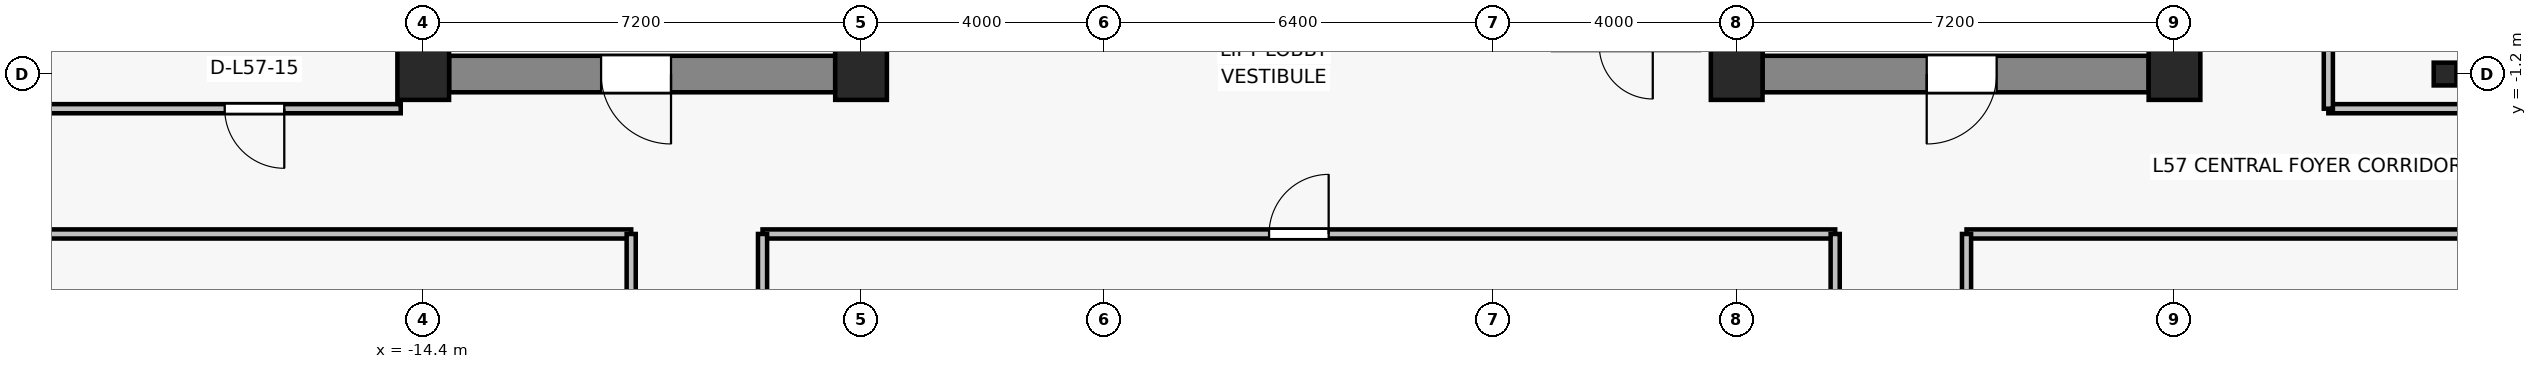
"""IFC4 building model, lengths in metres.
Left out: names, types, materials, properties, quantities, classifications, styles, units other than length and angle.
Written with IfcOpenShell. Run it as: python <this file> out.ifc"""

import sys

from ifc_helpers import new_model, si_unit, direction, frame, frame_2d, origin, origin_2d, place, context, subcontext, project, spatial, rectangle, i_section, extrude, source, transform, mapped, element, fill, save


model = new_model("IFC4")
c1 = context("Model", 3, precision=1e-05, world=origin(), true_north=direction((0.0, 1.0)))
c2 = subcontext(c1, "Body", "Model", "MODEL_VIEW")
j1 = project(units=[si_unit("LENGTHUNIT", "METRE"), si_unit("PLANEANGLEUNIT", "RADIAN")], contexts=[c1])
p1 = place(None, origin())
s1 = spatial("IfcSite", under=j1, at=p1, CompositionType="ELEMENT")
p2 = place(p1, origin())
s2 = spatial("IfcBuilding", under=s1, at=p2, CompositionType="ELEMENT")
p3 = place(p2, frame((0.0, 0.0, 205.6)))
s3 = spatial("IfcBuildingStorey", under=s2, at=p3, CompositionType="ELEMENT", Elevation=205.6)
for number, where, z_axis, x_axis in (
    (1, (-14.4, -1.2, 0.0), (0.0, 0.0, 1.0), (1.0, 0.0, 0.0)),
    (2, (-7.2, -1.2, 0.0), (0.0, 0.0, 1.0), (1.0, 0.0, 0.0)),
    (3, (7.2, -1.2, 0.0), (0.0, 0.0, 1.0), (1.0, 0.0, 0.0)),
    (4, (14.4, -1.2, 0.0), (0.0, 0.0, 1.0), (1.0, 0.0, 0.0)),
):
    element("IfcColumn", number, at=place(p3, frame(where, z_axis=z_axis, x_axis=x_axis)), inside=s3, PredefinedType="COLUMN", context=c2, shape_type="SweptSolid", body=[
        extrude(rectangle(XDim=0.85, YDim=0.85, at=origin_2d()), origin(), (0.0, 0.0, 1.0), 3.3),
    ])
p4 = place(p3, frame((18.85, -1.2, 0.0), z_axis=(0.0, 0.0, 1.0), x_axis=(1.0, 0.0, 0.0)))
e5 = element("IfcColumn", 5, at=p4, inside=s3, PredefinedType="COLUMN", context=c2, shape_type="SweptSolid", body=[
    extrude(i_section(OverallWidth=0.375, OverallDepth=0.375, WebThickness=0.017, FlangeThickness=0.027, FilletRadius=0.015, at=origin_2d()), origin(), (0.0, 0.0, 1.0), 3.3),
])
p5 = place(p3, frame((-7.625, -1.2, 0.0), z_axis=(0.0, 0.0, 1.0), x_axis=(-1.0, 0.0, 0.0)))
e6 = element("IfcWall", 6, at=p5, inside=s3, PredefinedType="SHEAR", context=c2, shape_type="SweptSolid", body=[
    extrude(rectangle(XDim=6.35, YDim=0.6, at=frame_2d((3.175, 0.0))), origin(), (0.0, 0.0, 1.0), 3.075),
])
p6 = place(p5, frame((2.7, 0.0, 0.0)))
e7 = element("IfcOpeningElement", 7, at=p6, cuts=e6, PredefinedType="OPENING", context=c2, shape_type="SweptSolid", body=[
    extrude(rectangle(XDim=1.15, YDim=2.15, at=frame_2d((0.575, 1.075))), frame((0.0, 0.31, 0.0), z_axis=(0.0, -1.0, 0.0), x_axis=(1.0, 0.0, 0.0)), (0.0, 0.0, 1.0), 0.62),
])
p7 = place(p3, frame((13.975, -1.2, 0.0), z_axis=(0.0, 0.0, 1.0), x_axis=(-1.0, 0.0, 0.0)))
e8 = element("IfcWall", 8, at=p7, inside=s3, PredefinedType="SHEAR", context=c2, shape_type="SweptSolid", body=[
    extrude(rectangle(XDim=6.35, YDim=0.6, at=frame_2d((3.175, 0.0))), origin(), (0.0, 0.0, 1.0), 3.075),
])
p8 = place(p7, frame((2.5, 0.0, 0.0)))
e9 = element("IfcOpeningElement", 9, at=p8, cuts=e8, PredefinedType="OPENING", context=c2, shape_type="SweptSolid", body=[
    extrude(rectangle(XDim=1.15, YDim=2.15, at=frame_2d((0.575, 1.075))), frame((0.0, 0.31, 0.0), z_axis=(0.0, -1.0, 0.0), x_axis=(1.0, 0.0, 0.0)), (0.0, 0.0, 1.0), 0.62),
])
for number, where, z_axis, x_axis in (
    (10, (-7.4, -0.9, 0.0), (0.0, 0.0, 1.0), (0.0, 1.0, 0.0)),
    (11, (7.4, -0.9, 0.0), (0.0, 0.0, 1.0), (0.0, 1.0, 0.0)),
):
    element("IfcWall", number, at=place(p3, frame(where, z_axis=z_axis, x_axis=x_axis)), inside=s3, PredefinedType="SHEAR", context=c2, shape_type="SweptSolid", body=[
        extrude(rectangle(XDim=4.15, YDim=0.45, at=frame_2d((2.075, 0.0))), origin(), (0.0, 0.0, 1.0), 3.075),
    ])
p9 = place(p3, frame((-23.53, -3.83, 0.0), z_axis=(0.0, 0.0, 1.0), x_axis=(1.0, 0.0, 0.0)))
e12 = element("IfcWall", 12, at=p9, inside=s3, PredefinedType="PARTITIONING", context=c2, shape_type="SweptSolid", body=[
    extrude(rectangle(XDim=12.55, YDim=0.15, at=frame_2d((6.275, 0.0))), origin(), (0.0, 0.0, 1.0), 2.615),
])
p10 = place(p3, frame((-10.98, -3.83, 0.0), z_axis=(0.0, 0.0, 1.0), x_axis=(0.0, -1.0, 0.0)))
e13 = element("IfcWall", 13, at=p10, inside=s3, PredefinedType="PARTITIONING", context=c2, shape_type="SweptSolid", body=[
    extrude(rectangle(XDim=13.2, YDim=0.15, at=frame_2d((6.6, 0.0))), origin(), (0.0, 0.0, 1.0), 2.615),
])
p11 = place(p10, frame((2.88, 0.0, 0.0)))
e14 = element("IfcOpeningElement", 14, at=p11, cuts=e13, PredefinedType="OPENING", context=c2, shape_type="SweptSolid", body=[
    extrude(rectangle(XDim=0.98, YDim=2.15, at=frame_2d((0.49, 1.075))), frame((0.0, 0.085, 0.0), z_axis=(0.0, -1.0, 0.0), x_axis=(1.0, 0.0, 0.0)), (0.0, 0.0, 1.0), 0.17),
])
p12 = place(p3, frame((10.98, -3.83, 0.0), z_axis=(0.0, 0.0, 1.0), x_axis=(1.0, 0.0, 0.0)))
e15 = element("IfcWall", 15, at=p12, inside=s3, PredefinedType="PARTITIONING", context=c2, shape_type="SweptSolid", body=[
    extrude(rectangle(XDim=8.55, YDim=0.15, at=frame_2d((4.275, 0.0))), origin(), (0.0, 0.0, 1.0), 2.615),
])
p13 = place(p3, frame((10.98, -17.03, 0.0), z_axis=(0.0, 0.0, 1.0), x_axis=(0.0, 1.0, 0.0)))
e16 = element("IfcWall", 16, at=p13, inside=s3, PredefinedType="PARTITIONING", context=c2, shape_type="SweptSolid", body=[
    extrude(rectangle(XDim=13.2, YDim=0.15, at=frame_2d((6.6, 0.0))), origin(), (0.0, 0.0, 1.0), 2.615),
])
p14 = place(p13, frame((9.34, 0.0, 0.0)))
e17 = element("IfcOpeningElement", 17, at=p14, cuts=e16, PredefinedType="OPENING", context=c2, shape_type="SweptSolid", body=[
    extrude(rectangle(XDim=0.98, YDim=2.15, at=frame_2d((0.49, 1.075))), frame((0.0, 0.085, 0.0), z_axis=(0.0, -1.0, 0.0), x_axis=(1.0, 0.0, 0.0)), (0.0, 0.0, 1.0), 0.17),
])
p15 = place(p3, frame((-8.82, -3.83, 0.0), z_axis=(0.0, 0.0, 1.0), x_axis=(1.0, 0.0, 0.0)))
e18 = element("IfcWall", 18, at=p15, inside=s3, PredefinedType="PARTITIONING", context=c2, shape_type="SweptSolid", body=[
    extrude(rectangle(XDim=17.64, YDim=0.15, at=frame_2d((8.82, 0.0))), origin(), (0.0, 0.0, 1.0), 2.615),
])
p16 = place(p15, frame((8.33, 0.0, 0.0)))
e19 = element("IfcOpeningElement", 19, at=p16, cuts=e18, PredefinedType="OPENING", context=c2, shape_type="SweptSolid", body=[
    extrude(rectangle(XDim=0.98, YDim=2.15, at=frame_2d((0.49, 1.075))), frame((0.0, 0.085, 0.0), z_axis=(0.0, -1.0, 0.0), x_axis=(1.0, 0.0, 0.0)), (0.0, 0.0, 1.0), 0.17),
])
for number, where, z_axis, x_axis in (
    (20, (-8.82, -13.2, 0.0), (0.0, 0.0, 1.0), (0.0, 1.0, 0.0)),
    (21, (8.82, -3.83, 0.0), (0.0, 0.0, 1.0), (0.0, -1.0, 0.0)),
):
    element("IfcWall", number, at=place(p3, frame(where, z_axis=z_axis, x_axis=x_axis)), inside=s3, PredefinedType="PARTITIONING", context=c2, shape_type="SweptSolid", body=[
        extrude(rectangle(XDim=9.37, YDim=0.15, at=frame_2d((4.685, 0.0))), origin(), (0.0, 0.0, 1.0), 2.615),
    ])
p17 = place(p3, frame((-14.77, -1.77, 0.0), z_axis=(0.0, 0.0, 1.0), x_axis=(-1.0, 0.0, 0.0)))
e22 = element("IfcWall", 22, at=p17, inside=s3, PredefinedType="PARTITIONING", context=c2, shape_type="SweptSolid", body=[
    extrude(rectangle(XDim=8.76, YDim=0.15, at=frame_2d((4.38, 0.0))), origin(), (0.0, 0.0, 1.0), 2.765),
])
p18 = place(p17, frame((1.915, 0.0, 0.0)))
e23 = element("IfcOpeningElement", 23, at=p18, cuts=e22, PredefinedType="OPENING", context=c2, shape_type="SweptSolid", body=[
    extrude(rectangle(XDim=0.98, YDim=2.15, at=frame_2d((0.49, 1.075))), frame((0.0, 0.085, 0.0), z_axis=(0.0, -1.0, 0.0), x_axis=(1.0, 0.0, 0.0)), (0.0, 0.0, 1.0), 0.17),
])
p19 = place(p3, frame((19.53, -1.77, 0.0), z_axis=(0.0, 0.0, 1.0), x_axis=(-1.0, 0.0, 0.0)))
e24 = element("IfcWall", 24, at=p19, inside=s3, PredefinedType="PARTITIONING", context=c2, shape_type="SweptSolid", body=[
    extrude(rectangle(XDim=2.6, YDim=0.15, at=frame_2d((1.3, 0.0))), origin(), (0.0, 0.0, 1.0), 2.765),
])
p20 = place(p3, frame((16.93, -1.77, 0.0), z_axis=(0.0, 0.0, 1.0), x_axis=(0.0, 1.0, 0.0)))
e25 = element("IfcWall", 25, at=p20, inside=s3, PredefinedType="PARTITIONING", context=c2, shape_type="SweptSolid", body=[
    extrude(rectangle(XDim=15.65, YDim=0.15, at=frame_2d((7.825, 0.0))), origin(), (0.0, 0.0, 1.0), 2.615),
])
p21 = place(p20, frame((7.335, 0.0, 0.0)))
e26 = element("IfcOpeningElement", 26, at=p21, cuts=e25, PredefinedType="OPENING", context=c2, shape_type="SweptSolid", body=[
    extrude(rectangle(XDim=0.98, YDim=2.15, at=frame_2d((0.49, 1.075))), frame((0.0, 0.085, 0.0), z_axis=(0.0, -1.0, 0.0), x_axis=(1.0, 0.0, 0.0)), (0.0, 0.0, 1.0), 0.17),
])
m1 = source(origin(), c2, "Body", "SweptSolid", [
    extrude(rectangle(XDim=1.15, YDim=2.15, at=frame_2d((0.575, 1.075))), frame((0.0, 0.025, 0.0), z_axis=(0.0, -1.0, 0.0), x_axis=(1.0, 0.0, 0.0)), (0.0, 0.0, 1.0), 0.05),
])
p22 = place(p6, origin())
e27 = element("IfcDoor", 27, at=p22, inside=s3, OperationType="SINGLE_SWING_LEFT", PredefinedType="DOOR", context=c2, shape_type="MappedRepresentation", body=[
    mapped(m1, transform((0.0, 0.0, 0.0), x_axis=(1.0, 0.0, 0.0), y_axis=(0.0, 1.0, 0.0), z_axis=(0.0, 0.0, 1.0), scale=1.0)),
])
fill(e7, e27)
p23 = place(p8, origin())
e28 = element("IfcDoor", 28, at=p23, inside=s3, OperationType="SINGLE_SWING_RIGHT", PredefinedType="DOOR", context=c2, shape_type="MappedRepresentation", body=[
    mapped(m1, transform((0.0, 0.0, 0.0), x_axis=(1.0, 0.0, 0.0), y_axis=(0.0, 1.0, 0.0), z_axis=(0.0, 0.0, 1.0), scale=1.0)),
])
fill(e9, e28)
m2 = source(origin(), c2, "Body", "SweptSolid", [
    extrude(rectangle(XDim=0.98, YDim=2.15, at=frame_2d((0.49, 1.075))), frame((0.0, 0.025, 0.0), z_axis=(0.0, -1.0, 0.0), x_axis=(1.0, 0.0, 0.0)), (0.0, 0.0, 1.0), 0.05),
])
p24 = place(p16, origin())
e29 = element("IfcDoor", 29, at=p24, inside=s3, OperationType="SINGLE_SWING_RIGHT", PredefinedType="DOOR", context=c2, shape_type="MappedRepresentation", body=[
    mapped(m2, transform((0.0, 0.0, 0.0), x_axis=(1.0, 0.0, 0.0), y_axis=(0.0, 1.0, 0.0), z_axis=(0.0, 0.0, 1.0), scale=1.0)),
])
fill(e19, e29)
p25 = place(p18, origin())
e30 = element("IfcDoor", 30, at=p25, inside=s3, OperationType="SINGLE_SWING_LEFT", PredefinedType="DOOR", context=c2, shape_type="MappedRepresentation", body=[
    mapped(m2, transform((0.0, 0.0, 0.0), x_axis=(1.0, 0.0, 0.0), y_axis=(0.0, 1.0, 0.0), z_axis=(0.0, 0.0, 1.0), scale=1.0)),
])
fill(e23, e30)
save(model, sys.argv[1])
